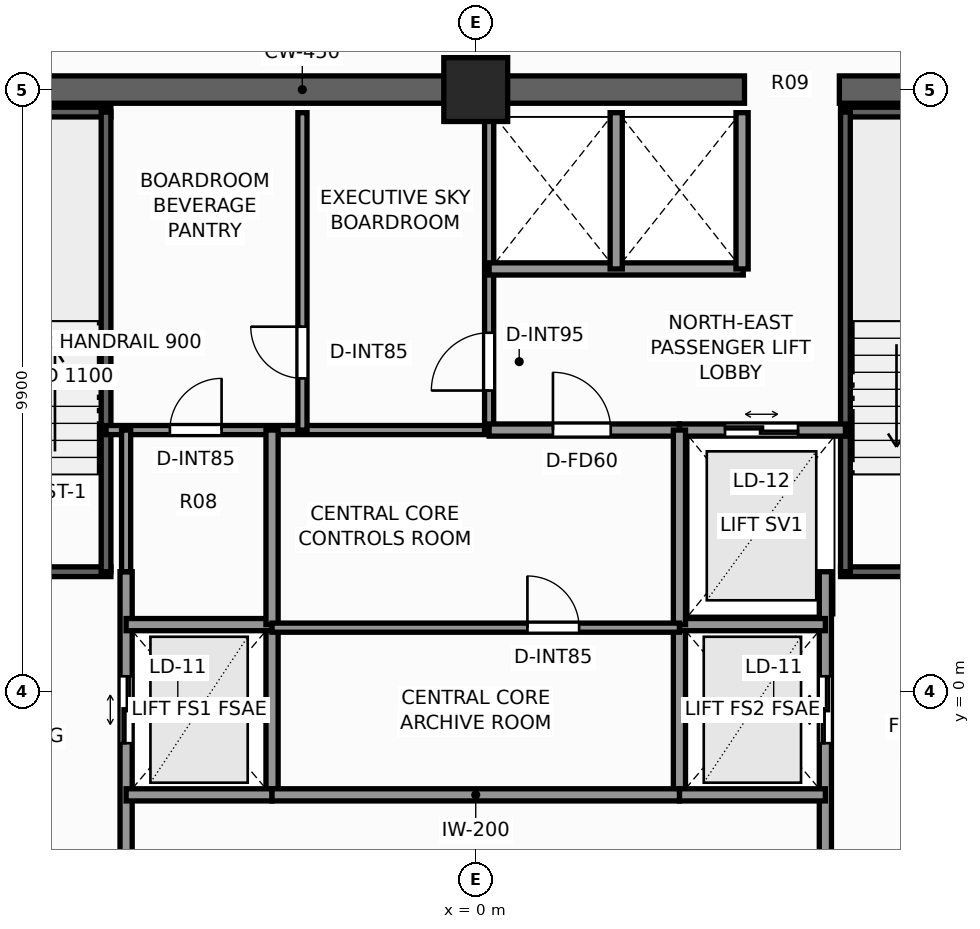
"""IFC4 building model, lengths in metres.
Left out: names, types, materials, properties, quantities, classifications, styles, units other than length and angle.
Written with IfcOpenShell. Run it as: python <this file> out.ifc"""

import sys

from ifc_helpers import new_model, si_unit, direction, frame, frame_2d, origin, origin_2d, place, context, subcontext, project, spatial, rectangle, extrude, element, fill, save


model = new_model("IFC4")
c1 = context("Model", 3, precision=1e-05, world=origin(), true_north=direction((0.0, 1.0)))
c2 = subcontext(c1, "Body", "Model", "MODEL_VIEW")
j1 = project(units=[si_unit("LENGTHUNIT", "METRE"), si_unit("PLANEANGLEUNIT", "RADIAN")], contexts=[c1])
p1 = place(None, origin())
s1 = spatial("IfcSite", under=j1, at=p1, CompositionType="ELEMENT")
p2 = place(p1, origin())
s2 = spatial("IfcBuilding", under=s1, at=p2, CompositionType="ELEMENT")
p3 = place(p2, frame((0.0, 0.0, 219.6)))
s3 = spatial("IfcBuildingStorey", under=s2, at=p3, CompositionType="ELEMENT", Elevation=219.6)
p4 = place(p3, frame((-10.125, 9.9, 0.0), z_axis=(0.0, 0.0, 1.0), x_axis=(1.0, 0.0, 0.0)))
e1 = element("IfcWall", 1, at=p4, inside=s3, PredefinedType="SHEAR", context=c2, shape_type="SweptSolid", body=[
    extrude(rectangle(XDim=14.545, YDim=0.45, at=frame_2d((7.272, 0.0))), origin(), (0.0, 0.0, 1.0), 3.3),
])
p5 = place(p3, frame((5.98, 9.9, 0.0), z_axis=(0.0, 0.0, 1.0), x_axis=(1.0, 0.0, 0.0)))
e2 = element("IfcWall", 2, at=p5, inside=s3, PredefinedType="SHEAR", context=c2, shape_type="SweptSolid", body=[
    extrude(rectangle(XDim=4.145, YDim=0.45, at=frame_2d((2.073, 0.0))), origin(), (0.0, 0.0, 1.0), 3.3),
])
p6 = place(p3, frame((0.0, 9.9, 0.0), z_axis=(0.0, 0.0, 1.0), x_axis=(1.0, 0.0, 0.0)))
e3 = element("IfcColumn", 3, at=p6, inside=s3, PredefinedType="COLUMN", context=c2, shape_type="SweptSolid", body=[
    extrude(rectangle(XDim=1.05, YDim=1.05, at=origin_2d()), origin(), (0.0, 0.0, 1.0), 3.3),
])
p7 = place(p3, frame((-9.52, 1.97, 0.0), z_axis=(0.0, 0.0, 1.0), x_axis=(1.0, 0.0, 0.0)))
e4 = element("IfcWall", 4, at=p7, inside=s3, PredefinedType="SHEAR", context=c2, shape_type="SweptSolid", body=[
    extrude(rectangle(XDim=3.52, YDim=0.16, at=frame_2d((1.76, 0.0))), origin(), (0.0, 0.0, 1.0), 3.3),
])
p8 = place(p7, frame((1.15, 0.0, 0.0)))
e5 = element("IfcOpeningElement", 5, at=p8, cuts=e4, PredefinedType="OPENING", context=c2, shape_type="SweptSolid", body=[
    extrude(rectangle(XDim=1.1, YDim=2.2, at=frame_2d((0.55, 1.1))), frame((0.0, 0.09, 0.0), z_axis=(0.0, -1.0, 0.0), x_axis=(1.0, 0.0, 0.0)), (0.0, 0.0, 1.0), 0.18),
])
p9 = place(p3, frame((-9.52, 9.53, 0.0), z_axis=(0.0, 0.0, 1.0), x_axis=(1.0, 0.0, 0.0)))
e6 = element("IfcWall", 6, at=p9, inside=s3, PredefinedType="SHEAR", context=c2, shape_type="SweptSolid", body=[
    extrude(rectangle(XDim=3.52, YDim=0.16, at=frame_2d((1.76, 0.0))), origin(), (0.0, 0.0, 1.0), 3.3),
])
p10 = place(p3, frame((-6.08, 1.97, 0.0), z_axis=(0.0, 0.0, 1.0), x_axis=(0.0, 1.0, 0.0)))
e7 = element("IfcWall", 7, at=p10, inside=s3, PredefinedType="SHEAR", context=c2, shape_type="SweptSolid", body=[
    extrude(rectangle(XDim=7.56, YDim=0.16, at=frame_2d((3.78, 0.0))), origin(), (0.0, 0.0, 1.0), 3.3),
])
p11 = place(p3, frame((6.0, 1.97, 0.0), z_axis=(0.0, 0.0, 1.0), x_axis=(1.0, 0.0, 0.0)))
e8 = element("IfcWall", 8, at=p11, inside=s3, PredefinedType="SHEAR", context=c2, shape_type="SweptSolid", body=[
    extrude(rectangle(XDim=3.52, YDim=0.16, at=frame_2d((1.76, 0.0))), origin(), (0.0, 0.0, 1.0), 3.3),
])
p12 = place(p11, frame((1.15, 0.0, 0.0)))
e9 = element("IfcOpeningElement", 9, at=p12, cuts=e8, PredefinedType="OPENING", context=c2, shape_type="SweptSolid", body=[
    extrude(rectangle(XDim=1.1, YDim=2.2, at=frame_2d((0.55, 1.1))), frame((0.0, 0.09, 0.0), z_axis=(0.0, -1.0, 0.0), x_axis=(1.0, 0.0, 0.0)), (0.0, 0.0, 1.0), 0.18),
])
p13 = place(p3, frame((6.0, 9.53, 0.0), z_axis=(0.0, 0.0, 1.0), x_axis=(1.0, 0.0, 0.0)))
e10 = element("IfcWall", 10, at=p13, inside=s3, PredefinedType="SHEAR", context=c2, shape_type="SweptSolid", body=[
    extrude(rectangle(XDim=3.52, YDim=0.16, at=frame_2d((1.76, 0.0))), origin(), (0.0, 0.0, 1.0), 3.3),
])
p14 = place(p3, frame((6.08, 1.97, 0.0), z_axis=(0.0, 0.0, 1.0), x_axis=(0.0, 1.0, 0.0)))
e11 = element("IfcWall", 11, at=p14, inside=s3, PredefinedType="SHEAR", context=c2, shape_type="SweptSolid", body=[
    extrude(rectangle(XDim=7.56, YDim=0.16, at=frame_2d((3.78, 0.0))), origin(), (0.0, 0.0, 1.0), 3.3),
])
p15 = place(p3, frame((-5.75, -3.6, 0.0), z_axis=(0.0, 0.0, 1.0), x_axis=(0.0, 1.0, 0.0)))
e12 = element("IfcWall", 12, at=p15, inside=s3, PredefinedType="SOLIDWALL", context=c2, shape_type="SweptSolid", body=[
    extrude(rectangle(XDim=5.57, YDim=0.2, at=frame_2d((2.785, 0.0))), origin(), (0.0, 0.0, 1.0), 3.08),
])
p16 = place(p15, frame((2.75, 0.0, 0.0)))
e13 = element("IfcOpeningElement", 13, at=p16, cuts=e12, PredefinedType="OPENING", context=c2, shape_type="SweptSolid", body=[
    extrude(rectangle(XDim=1.1, YDim=2.2, at=frame_2d((0.55, 1.1))), frame((0.0, 0.11, 0.0), z_axis=(0.0, -1.0, 0.0), x_axis=(1.0, 0.0, 0.0)), (0.0, 0.0, 1.0), 0.22),
])
p17 = place(p3, frame((-3.35, -1.7, 0.0), z_axis=(0.0, 0.0, 1.0), x_axis=(0.0, 1.0, 0.0)))
e14 = element("IfcWall", 14, at=p17, inside=s3, PredefinedType="SOLIDWALL", context=c2, shape_type="SweptSolid", body=[
    extrude(rectangle(XDim=2.8, YDim=0.2, at=frame_2d((1.4, 0.0))), origin(), (0.0, 0.0, 1.0), 3.08),
])
for number, where, z_axis, x_axis in (
    (15, (-5.75, -1.7, 0.0), (0.0, 0.0, 1.0), (1.0, 0.0, 0.0)),
    (16, (-5.75, 1.1, 0.0), (0.0, 0.0, 1.0), (1.0, 0.0, 0.0)),
):
    element("IfcWall", number, at=place(p3, frame(where, z_axis=z_axis, x_axis=x_axis)), inside=s3, PredefinedType="SOLIDWALL", context=c2, shape_type="SweptSolid", body=[
        extrude(rectangle(XDim=2.4, YDim=0.2, at=frame_2d((1.2, 0.0))), origin(), (0.0, 0.0, 1.0), 3.08),
    ])
p18 = place(p3, frame((5.75, -3.6, 0.0), z_axis=(0.0, 0.0, 1.0), x_axis=(0.0, 1.0, 0.0)))
e17 = element("IfcWall", 17, at=p18, inside=s3, PredefinedType="SOLIDWALL", context=c2, shape_type="SweptSolid", body=[
    extrude(rectangle(XDim=5.57, YDim=0.2, at=frame_2d((2.785, 0.0))), origin(), (0.0, 0.0, 1.0), 3.08),
])
p19 = place(p18, frame((2.75, 0.0, 0.0)))
e18 = element("IfcOpeningElement", 18, at=p19, cuts=e17, PredefinedType="OPENING", context=c2, shape_type="SweptSolid", body=[
    extrude(rectangle(XDim=1.1, YDim=2.2, at=frame_2d((0.55, 1.1))), frame((0.0, 0.11, 0.0), z_axis=(0.0, -1.0, 0.0), x_axis=(1.0, 0.0, 0.0)), (0.0, 0.0, 1.0), 0.22),
])
p20 = place(p3, frame((3.35, -1.7, 0.0), z_axis=(0.0, 0.0, 1.0), x_axis=(0.0, 1.0, 0.0)))
e19 = element("IfcWall", 19, at=p20, inside=s3, PredefinedType="SOLIDWALL", context=c2, shape_type="SweptSolid", body=[
    extrude(rectangle(XDim=2.8, YDim=0.2, at=frame_2d((1.4, 0.0))), origin(), (0.0, 0.0, 1.0), 3.08),
])
for number, where, z_axis, x_axis in (
    (20, (3.35, -1.7, 0.0), (0.0, 0.0, 1.0), (1.0, 0.0, 0.0)),
    (21, (3.35, 1.1, 0.0), (0.0, 0.0, 1.0), (1.0, 0.0, 0.0)),
):
    element("IfcWall", number, at=place(p3, frame(where, z_axis=z_axis, x_axis=x_axis)), inside=s3, PredefinedType="SOLIDWALL", context=c2, shape_type="SweptSolid", body=[
        extrude(rectangle(XDim=2.4, YDim=0.2, at=frame_2d((1.2, 0.0))), origin(), (0.0, 0.0, 1.0), 3.08),
    ])
p21 = place(p3, frame((3.35, 4.3, 0.0), z_axis=(0.0, 0.0, 1.0), x_axis=(1.0, 0.0, 0.0)))
e22 = element("IfcWall", 22, at=p21, inside=s3, PredefinedType="SOLIDWALL", context=c2, shape_type="SweptSolid", body=[
    extrude(rectangle(XDim=2.73, YDim=0.2, at=frame_2d((1.365, 0.0))), origin(), (0.0, 0.0, 1.0), 3.08),
])
p22 = place(p21, frame((0.75, 0.0, 0.0)))
e23 = element("IfcOpeningElement", 23, at=p22, cuts=e22, PredefinedType="OPENING", context=c2, shape_type="SweptSolid", body=[
    extrude(rectangle(XDim=1.2, YDim=2.25, at=frame_2d((0.6, 1.125))), frame((0.0, 0.11, 0.0), z_axis=(0.0, -1.0, 0.0), x_axis=(1.0, 0.0, 0.0)), (0.0, 0.0, 1.0), 0.22),
])
p23 = place(p3, frame((-6.08, 4.3, 0.0), z_axis=(0.0, 0.0, 1.0), x_axis=(1.0, 0.0, 0.0)))
e24 = element("IfcWall", 24, at=p23, inside=s3, PredefinedType="PARTITIONING", context=c2, shape_type="SweptSolid", body=[
    extrude(rectangle(XDim=6.3, YDim=0.15, at=frame_2d((3.15, 0.0))), origin(), (0.0, 0.0, 1.0), 3.08),
])
p24 = place(p23, frame((1.05, 0.0, 0.0)))
e25 = element("IfcOpeningElement", 25, at=p24, cuts=e24, PredefinedType="OPENING", context=c2, shape_type="SweptSolid", body=[
    extrude(rectangle(XDim=0.85, YDim=2.03, at=frame_2d((0.425, 1.015))), frame((0.0, 0.085, 0.0), z_axis=(0.0, -1.0, 0.0), x_axis=(1.0, 0.0, 0.0)), (0.0, 0.0, 1.0), 0.17),
])
p25 = place(p3, frame((0.22, 4.3, 0.0), z_axis=(0.0, 0.0, 1.0), x_axis=(0.0, 1.0, 0.0)))
e26 = element("IfcWall", 26, at=p25, inside=s3, PredefinedType="PARTITIONING", context=c2, shape_type="SweptSolid", body=[
    extrude(rectangle(XDim=5.22, YDim=0.15, at=frame_2d((2.61, 0.0))), origin(), (0.0, 0.0, 1.0), 3.08),
])
p26 = place(p25, frame((0.65, 0.0, 0.0)))
e27 = element("IfcOpeningElement", 27, at=p26, cuts=e26, PredefinedType="OPENING", context=c2, shape_type="SweptSolid", body=[
    extrude(rectangle(XDim=0.95, YDim=2.06, at=frame_2d((0.475, 1.03))), frame((0.0, 0.085, 0.0), z_axis=(0.0, -1.0, 0.0), x_axis=(1.0, 0.0, 0.0)), (0.0, 0.0, 1.0), 0.17),
])
p27 = place(p3, frame((-2.85, 4.3, 0.0), z_axis=(0.0, 0.0, 1.0), x_axis=(0.0, 1.0, 0.0)))
e28 = element("IfcWall", 28, at=p27, inside=s3, PredefinedType="PARTITIONING", context=c2, shape_type="SweptSolid", body=[
    extrude(rectangle(XDim=5.22, YDim=0.15, at=frame_2d((2.61, 0.0))), origin(), (0.0, 0.0, 1.0), 3.08),
])
p28 = place(p27, frame((0.85, 0.0, 0.0)))
e29 = element("IfcOpeningElement", 29, at=p28, cuts=e28, PredefinedType="OPENING", context=c2, shape_type="SweptSolid", body=[
    extrude(rectangle(XDim=0.85, YDim=2.03, at=frame_2d((0.425, 1.015))), frame((0.0, 0.085, 0.0), z_axis=(0.0, -1.0, 0.0), x_axis=(1.0, 0.0, 0.0)), (0.0, 0.0, 1.0), 0.17),
])
p29 = place(p3, frame((0.22, 6.95, 0.0), z_axis=(0.0, 0.0, 1.0), x_axis=(1.0, 0.0, 0.0)))
e30 = element("IfcWall", 30, at=p29, inside=s3, PredefinedType="SOLIDWALL", context=c2, shape_type="SweptSolid", body=[
    extrude(rectangle(XDim=4.18, YDim=0.2, at=frame_2d((2.09, 0.0))), origin(), (0.0, 0.0, 1.0), 3.08),
])
for number, where, z_axis, x_axis in (
    (31, (4.38, 6.95, 0.0), (0.0, 0.0, 1.0), (0.0, 1.0, 0.0)),
    (32, (2.31, 6.95, 0.0), (0.0, 0.0, 1.0), (0.0, 1.0, 0.0)),
):
    element("IfcWall", number, at=place(p3, frame(where, z_axis=z_axis, x_axis=x_axis)), inside=s3, PredefinedType="SOLIDWALL", context=c2, shape_type="SweptSolid", body=[
        extrude(rectangle(XDim=2.57, YDim=0.2, at=frame_2d((1.285, 0.0))), origin(), (0.0, 0.0, 1.0), 3.08),
    ])
p30 = place(p3, frame((0.22, 4.3, 0.0), z_axis=(0.0, 0.0, 1.0), x_axis=(1.0, 0.0, 0.0)))
e33 = element("IfcWall", 33, at=p30, inside=s3, PredefinedType="SOLIDWALL", context=c2, shape_type="SweptSolid", body=[
    extrude(rectangle(XDim=3.13, YDim=0.2, at=frame_2d((1.565, 0.0))), origin(), (0.0, 0.0, 1.0), 3.08),
])
p31 = place(p30, frame((1.05, 0.0, 0.0)))
e34 = element("IfcOpeningElement", 34, at=p31, cuts=e33, PredefinedType="OPENING", context=c2, shape_type="SweptSolid", body=[
    extrude(rectangle(XDim=0.95, YDim=2.06, at=frame_2d((0.475, 1.03))), frame((0.0, 0.11, 0.0), z_axis=(0.0, -1.0, 0.0), x_axis=(1.0, 0.0, 0.0)), (0.0, 0.0, 1.0), 0.22),
])
p32 = place(p3, frame((-3.35, -1.7, 0.0), z_axis=(0.0, 0.0, 1.0), x_axis=(1.0, 0.0, 0.0)))
e35 = element("IfcWall", 35, at=p32, inside=s3, PredefinedType="SOLIDWALL", context=c2, shape_type="SweptSolid", body=[
    extrude(rectangle(XDim=6.7, YDim=0.2, at=frame_2d((3.35, 0.0))), origin(), (0.0, 0.0, 1.0), 3.08),
])
for number, where, z_axis, x_axis in (
    (36, (-3.35, 1.1, 0.0), (0.0, 0.0, 1.0), (0.0, 1.0, 0.0)),
    (37, (3.35, 1.1, 0.0), (0.0, 0.0, 1.0), (0.0, 1.0, 0.0)),
):
    element("IfcWall", number, at=place(p3, frame(where, z_axis=z_axis, x_axis=x_axis)), inside=s3, PredefinedType="SOLIDWALL", context=c2, shape_type="SweptSolid", body=[
        extrude(rectangle(XDim=3.2, YDim=0.2, at=frame_2d((1.6, 0.0))), origin(), (0.0, 0.0, 1.0), 3.08),
    ])
p33 = place(p3, frame((-3.35, 1.05, 0.0), z_axis=(0.0, 0.0, 1.0), x_axis=(1.0, 0.0, 0.0)))
e38 = element("IfcWall", 38, at=p33, inside=s3, PredefinedType="PARTITIONING", context=c2, shape_type="SweptSolid", body=[
    extrude(rectangle(XDim=6.7, YDim=0.15, at=frame_2d((3.35, 0.0))), origin(), (0.0, 0.0, 1.0), 3.08),
])
p34 = place(p33, frame((4.2, 0.0, 0.0)))
e39 = element("IfcOpeningElement", 39, at=p34, cuts=e38, PredefinedType="OPENING", context=c2, shape_type="SweptSolid", body=[
    extrude(rectangle(XDim=0.85, YDim=2.03, at=frame_2d((0.425, 1.015))), frame((0.0, 0.085, 0.0), z_axis=(0.0, -1.0, 0.0), x_axis=(1.0, 0.0, 0.0)), (0.0, 0.0, 1.0), 0.17),
])
p35 = place(p3, frame((-5.75, 1.97, 0.0), z_axis=(0.0, 0.0, 1.0), x_axis=(0.0, 1.0, 0.0)))
e40 = element("IfcWall", 40, at=p35, inside=s3, PredefinedType="PARTITIONING", context=c2, shape_type="SweptSolid", body=[
    extrude(rectangle(XDim=2.33, YDim=0.15, at=frame_2d((1.165, 0.0))), origin(), (0.0, 0.0, 1.0), 3.08),
])
p36 = place(p16, origin())
e41 = element("IfcDoor", 41, at=p36, inside=s3, OperationType="DOUBLE_DOOR_SLIDING", PredefinedType="DOOR", context=c2, shape_type="SweptSolid", body=[
    extrude(rectangle(XDim=1.1, YDim=2.2, at=frame_2d((0.55, 1.1))), frame((0.0, 0.025, 0.0), z_axis=(0.0, -1.0, 0.0), x_axis=(1.0, 0.0, 0.0)), (0.0, 0.0, 1.0), 0.05),
])
fill(e13, e41)
p37 = place(p19, origin())
e42 = element("IfcDoor", 42, at=p37, inside=s3, OperationType="DOUBLE_DOOR_SLIDING", PredefinedType="DOOR", context=c2, shape_type="SweptSolid", body=[
    extrude(rectangle(XDim=1.1, YDim=2.2, at=frame_2d((0.55, 1.1))), frame((0.0, 0.025, 0.0), z_axis=(0.0, -1.0, 0.0), x_axis=(1.0, 0.0, 0.0)), (0.0, 0.0, 1.0), 0.05),
])
fill(e18, e42)
p38 = place(p22, origin())
e43 = element("IfcDoor", 43, at=p38, inside=s3, OperationType="DOUBLE_DOOR_SLIDING", PredefinedType="DOOR", context=c2, shape_type="SweptSolid", body=[
    extrude(rectangle(XDim=1.2, YDim=2.25, at=frame_2d((0.6, 1.125))), frame((0.0, 0.025, 0.0), z_axis=(0.0, -1.0, 0.0), x_axis=(1.0, 0.0, 0.0)), (0.0, 0.0, 1.0), 0.05),
])
fill(e23, e43)
p39 = place(p26, origin())
e44 = element("IfcDoor", 44, at=p39, inside=s3, OperationType="SINGLE_SWING_LEFT", PredefinedType="DOOR", context=c2, shape_type="SweptSolid", body=[
    extrude(rectangle(XDim=0.95, YDim=2.06, at=frame_2d((0.475, 1.03))), frame((0.0, 0.025, 0.0), z_axis=(0.0, -1.0, 0.0), x_axis=(1.0, 0.0, 0.0)), (0.0, 0.0, 1.0), 0.05),
])
fill(e27, e44)
p40 = place(p28, origin())
e45 = element("IfcDoor", 45, at=p40, inside=s3, OperationType="SINGLE_SWING_RIGHT", PredefinedType="DOOR", context=c2, shape_type="SweptSolid", body=[
    extrude(rectangle(XDim=0.85, YDim=2.03, at=frame_2d((0.425, 1.015))), frame((0.0, 0.025, 0.0), z_axis=(0.0, -1.0, 0.0), x_axis=(1.0, 0.0, 0.0)), (0.0, 0.0, 1.0), 0.05),
])
fill(e29, e45)
p41 = place(p31, origin())
e46 = element("IfcDoor", 46, at=p41, inside=s3, OperationType="SINGLE_SWING_LEFT", PredefinedType="DOOR", context=c2, shape_type="SweptSolid", body=[
    extrude(rectangle(XDim=0.95, YDim=2.06, at=frame_2d((0.475, 1.03))), frame((0.0, 0.025, 0.0), z_axis=(0.0, -1.0, 0.0), x_axis=(1.0, 0.0, 0.0)), (0.0, 0.0, 1.0), 0.05),
])
fill(e34, e46)
p42 = place(p34, origin())
e47 = element("IfcDoor", 47, at=p42, inside=s3, OperationType="SINGLE_SWING_LEFT", PredefinedType="DOOR", context=c2, shape_type="SweptSolid", body=[
    extrude(rectangle(XDim=0.85, YDim=2.03, at=frame_2d((0.425, 1.015))), frame((0.0, 0.025, 0.0), z_axis=(0.0, -1.0, 0.0), x_axis=(1.0, 0.0, 0.0)), (0.0, 0.0, 1.0), 0.05),
])
fill(e39, e47)
p43 = place(p24, origin())
e48 = element("IfcDoor", 48, at=p43, inside=s3, OperationType="SINGLE_SWING_RIGHT", PredefinedType="DOOR", context=c2, shape_type="SweptSolid", body=[
    extrude(rectangle(XDim=0.85, YDim=2.03, at=frame_2d((0.425, 1.015))), frame((0.0, 0.025, 0.0), z_axis=(0.0, -1.0, 0.0), x_axis=(1.0, 0.0, 0.0)), (0.0, 0.0, 1.0), 0.05),
])
fill(e25, e48)
save(model, sys.argv[1])
